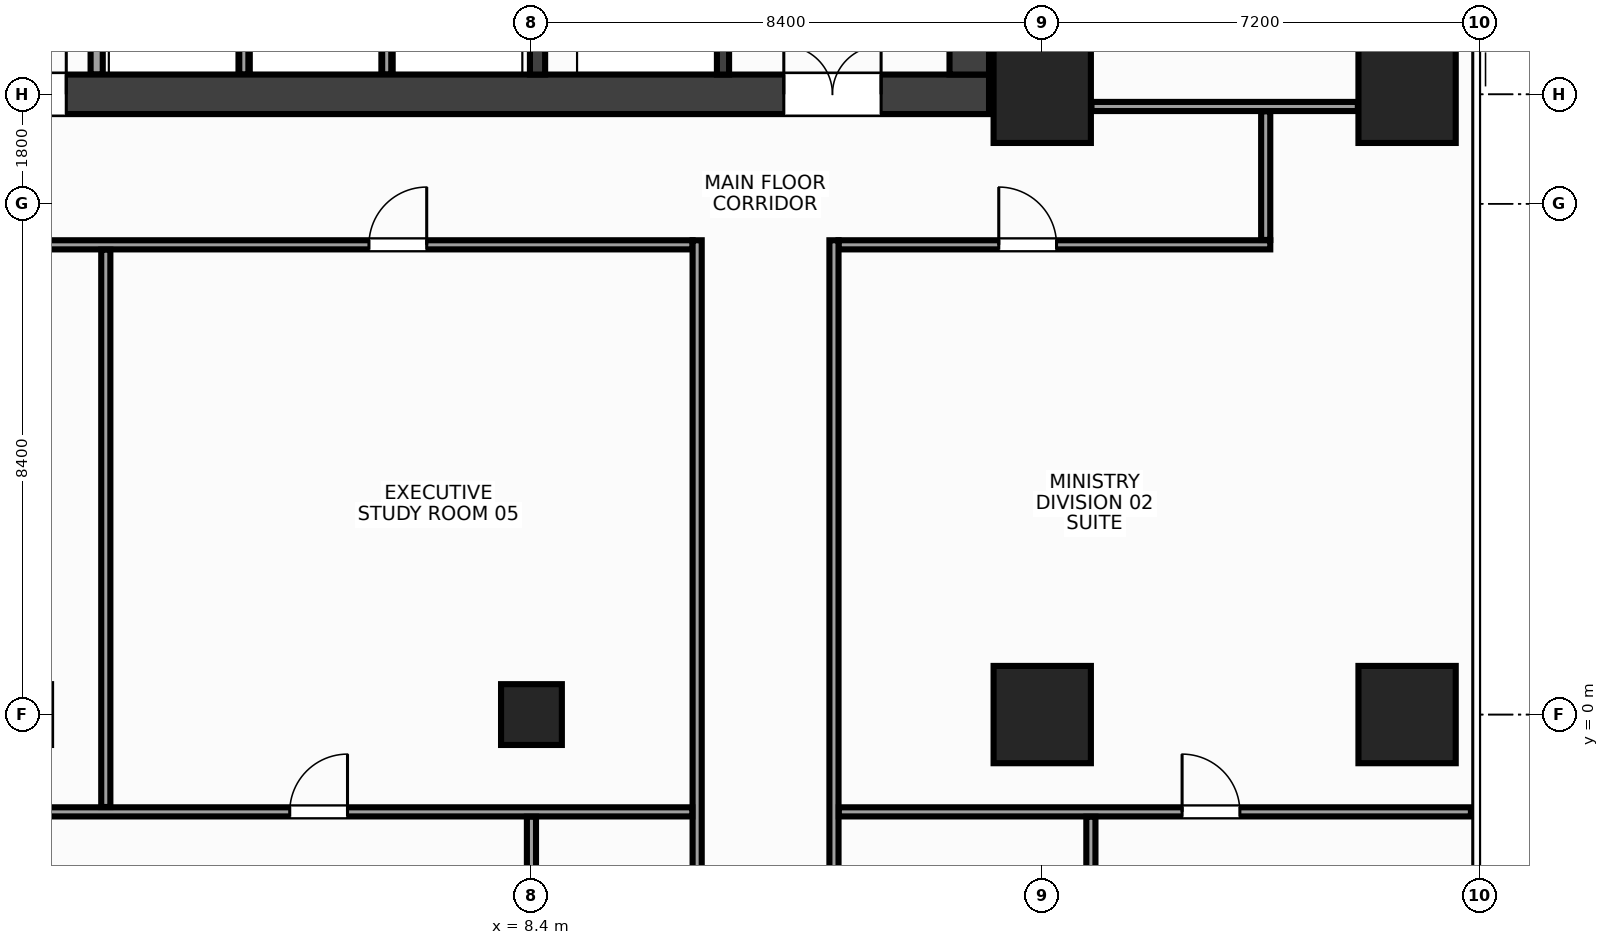
"""IFC4 building model, lengths in metres.
Left out: names, types, materials, properties, quantities, classifications, styles, units other than length and angle.
Written with IfcOpenShell. Run it as: python <this file> out.ifc"""

import sys

from ifc_helpers import new_model, si_unit, direction, frame, frame_2d, origin, origin_2d, place, context, subcontext, project, spatial, rectangle, hollow_rectangle, extrude, source, transform, mapped, element, fill, save


model = new_model("IFC4")
c1 = context("Model", 3, precision=1e-05, world=origin(), true_north=direction((0.0, 1.0)))
c2 = subcontext(c1, "Body", "Model", "MODEL_VIEW")
j1 = project(units=[si_unit("LENGTHUNIT", "METRE"), si_unit("PLANEANGLEUNIT", "RADIAN")], contexts=[c1])
p1 = place(None, origin())
s1 = spatial("IfcSite", under=j1, at=p1, CompositionType="ELEMENT")
p2 = place(p1, origin())
s2 = spatial("IfcBuilding", under=s1, at=p2, CompositionType="ELEMENT")
p3 = place(p2, frame((0.0, 0.0, 146.0)))
s3 = spatial("IfcBuildingStorey", under=s2, at=p3, CompositionType="ELEMENT", Elevation=146.0)
m1 = source(origin(), c2, "Body", "SweptSolid", [
    extrude(rectangle(XDim=31.85, YDim=0.65, at=frame_2d((15.925, 0.0))), origin(), (0.0, 0.0, 1.0), 3.6),
])
p4 = place(p3, frame((-15.925, 10.2, 0.0), z_axis=(0.0, 0.0, 1.0), x_axis=(1.0, 0.0, 0.0)))
e1 = element("IfcWall", 1, at=p4, inside=s3, PredefinedType="SHEAR", context=c2, shape_type="MappedRepresentation", body=[
    mapped(m1, transform((0.0, 0.0, 0.0), x_axis=(1.0, 0.0, 0.0), y_axis=(0.0, 1.0, 0.0), z_axis=(0.0, 0.0, 1.0), scale=1.0)),
])
p5 = place(p4, frame((1.775, 0.0, 0.0)))
e2 = element("IfcOpeningElement", 2, at=p5, cuts=e1, PredefinedType="OPENING", context=c2, shape_type="SweptSolid", body=[
    extrude(rectangle(XDim=1.6, YDim=2.15, at=frame_2d((0.8, 1.075))), frame((0.0, 0.337, 0.0), z_axis=(0.0, -1.0, 0.0), x_axis=(1.0, 0.0, 0.0)), (0.0, 0.0, 1.0), 0.674),
])
p6 = place(p4, frame((28.475, 0.0, 0.0)))
e3 = element("IfcOpeningElement", 3, at=p6, cuts=e1, PredefinedType="OPENING", context=c2, shape_type="SweptSolid", body=[
    extrude(rectangle(XDim=1.6, YDim=2.15, at=frame_2d((0.8, 1.075))), frame((0.0, 0.337, 0.0), z_axis=(0.0, -1.0, 0.0), x_axis=(1.0, 0.0, 0.0)), (0.0, 0.0, 1.0), 0.674),
])
p7 = place(p4, frame((15.175, 0.0, 0.0)))
e4 = element("IfcOpeningElement", 4, at=p7, cuts=e1, PredefinedType="OPENING", context=c2, shape_type="SweptSolid", body=[
    extrude(rectangle(XDim=1.5, YDim=2.2, at=frame_2d((0.75, 1.1))), frame((0.0, 0.337, 0.0), z_axis=(0.0, -1.0, 0.0), x_axis=(1.0, 0.0, 0.0)), (0.0, 0.0, 1.0), 0.674),
])
m2 = source(origin(), c2, "Body", "SweptSolid", [
    extrude(rectangle(XDim=12.95, YDim=0.65, at=frame_2d((6.475, 0.0))), origin(), (0.0, 0.0, 1.0), 3.6),
])
p8 = place(p3, frame((15.6, 10.525, 0.0), z_axis=(0.0, 0.0, 1.0), x_axis=(0.0, 1.0, 0.0)))
e5 = element("IfcWall", 5, at=p8, inside=s3, PredefinedType="SHEAR", context=c2, shape_type="MappedRepresentation", body=[
    mapped(m2, transform((0.0, 0.0, 0.0), x_axis=(1.0, 0.0, 0.0), y_axis=(0.0, 1.0, 0.0), z_axis=(0.0, 0.0, 1.0), scale=1.0)),
])
m3 = source(origin(), c2, "Body", "SweptSolid", [
    extrude(rectangle(XDim=12.95, YDim=0.25, at=frame_2d((6.475, 0.0))), origin(), (0.0, 0.0, 1.0), 3.6),
])
p9 = place(p3, frame((8.5, 10.525, 0.0), z_axis=(0.0, 0.0, 1.0), x_axis=(0.0, 1.0, 0.0)))
e6 = element("IfcWall", 6, at=p9, inside=s3, PredefinedType="SHEAR", context=c2, shape_type="MappedRepresentation", body=[
    mapped(m3, transform((0.0, 0.0, 0.0), x_axis=(1.0, 0.0, 0.0), y_axis=(0.0, 1.0, 0.0), z_axis=(0.0, 0.0, 1.0), scale=1.0)),
])
p10 = place(p9, frame((9.925, 0.0, 0.0)))
e7 = element("IfcOpeningElement", 7, at=p10, cuts=e6, PredefinedType="OPENING", context=c2, shape_type="SweptSolid", body=[
    extrude(rectangle(XDim=0.95, YDim=2.15, at=frame_2d((0.475, 1.075))), frame((0.0, 0.137, 0.0), z_axis=(0.0, -1.0, 0.0), x_axis=(1.0, 0.0, 0.0)), (0.0, 0.0, 1.0), 0.274),
])
m4 = source(origin(), c2, "Body", "SweptSolid", [
    extrude(rectangle(XDim=3.125, YDim=0.2, at=frame_2d((1.562, 0.0))), origin(), (0.0, 0.0, 1.0), 3.6),
])
p11 = place(p3, frame((11.55, 10.525, 0.0), z_axis=(0.0, 0.0, 1.0), x_axis=(0.0, 1.0, 0.0)))
e8 = element("IfcWall", 8, at=p11, inside=s3, PredefinedType="SHEAR", context=c2, shape_type="MappedRepresentation", body=[
    mapped(m4, transform((0.0, 0.0, 0.0), x_axis=(1.0, 0.0, 0.0), y_axis=(0.0, 1.0, 0.0), z_axis=(0.0, 0.0, 1.0), scale=1.0)),
])
p12 = place(p11, frame((0.9, 0.0, 0.0)))
e9 = element("IfcOpeningElement", 9, at=p12, cuts=e8, PredefinedType="OPENING", context=c2, shape_type="SweptSolid", body=[
    extrude(rectangle(XDim=1.1, YDim=2.15, at=frame_2d((0.55, 1.075))), frame((0.0, 0.112, 0.0), z_axis=(0.0, -1.0, 0.0), x_axis=(1.0, 0.0, 0.0)), (0.0, 0.0, 1.0), 0.224),
])
m5 = source(origin(), c2, "Body", "SweptSolid", [
    extrude(rectangle(XDim=1.6, YDim=1.6, at=origin_2d()), origin(), (0.0, 0.0, 1.0), 3.6),
])
for number, where, z_axis, x_axis in (
    (10, (16.8, 0.0, 0.0), (0.0, 0.0, 1.0), (1.0, 0.0, 0.0)),
    (11, (16.8, 10.2, 0.0), (0.0, 0.0, 1.0), (1.0, 0.0, 0.0)),
    (12, (22.8, 0.0, 0.0), (0.0, 0.0, 1.0), (1.0, 0.0, 0.0)),
    (13, (22.8, 10.2, 0.0), (0.0, 0.0, 1.0), (1.0, 0.0, 0.0)),
):
    element("IfcColumn", number, at=place(p3, frame(where, z_axis=z_axis, x_axis=x_axis)), inside=s3, PredefinedType="COLUMN", context=c2, shape_type="MappedRepresentation", body=[
        mapped(m5, transform((0.0, 0.0, 0.0), x_axis=(1.0, 0.0, 0.0), y_axis=(0.0, 1.0, 0.0), z_axis=(0.0, 0.0, 1.0), scale=1.0)),
    ])
m6 = source(origin(), c2, "Body", "SweptSolid", [
    extrude(hollow_rectangle(XDim=1.0, YDim=1.0, WallThickness=0.045, at=origin_2d()), origin(), (0.0, 0.0, 1.0), 3.6),
])
p13 = place(p3, frame((8.4, 0.0, 0.0), z_axis=(0.0, 0.0, 1.0), x_axis=(1.0, 0.0, 0.0)))
e14 = element("IfcColumn", 14, at=p13, inside=s3, PredefinedType="COLUMN", context=c2, shape_type="MappedRepresentation", body=[
    mapped(m6, transform((0.0, 0.0, 0.0), x_axis=(1.0, 0.0, 0.0), y_axis=(0.0, 1.0, 0.0), z_axis=(0.0, 0.0, 1.0), scale=1.0)),
])
m7 = source(origin(), c2, "Body", "SweptSolid", [
    extrude(rectangle(XDim=3.415, YDim=0.2, at=frame_2d((1.708, 0.0))), origin(), (0.0, 0.0, 1.0), 3.38),
])
p14 = place(p3, frame((1.25, 10.525, 0.0), z_axis=(0.0, 0.0, 1.0), x_axis=(0.0, 1.0, 0.0)))
e15 = element("IfcWall", 15, at=p14, inside=s3, PredefinedType="PARTITIONING", context=c2, shape_type="MappedRepresentation", body=[
    mapped(m7, transform((0.0, 0.0, 0.0), x_axis=(1.0, 0.0, 0.0), y_axis=(0.0, 1.0, 0.0), z_axis=(0.0, 0.0, 1.0), scale=1.0)),
])
m8 = source(origin(), c2, "Body", "SweptSolid", [
    extrude(rectangle(XDim=3.415, YDim=0.15, at=frame_2d((1.708, 0.0))), origin(), (0.0, 0.0, 1.0), 3.38),
])
for number, where, z_axis, x_axis in (
    (16, (3.67, 10.525, 0.0), (0.0, 0.0, 1.0), (0.0, 1.0, 0.0)),
    (17, (6.02, 10.525, 0.0), (0.0, 0.0, 1.0), (0.0, 1.0, 0.0)),
):
    element("IfcWall", number, at=place(p3, frame(where, z_axis=z_axis, x_axis=x_axis)), inside=s3, PredefinedType="PARTITIONING", context=c2, shape_type="MappedRepresentation", body=[
        mapped(m8, transform((0.0, 0.0, 0.0), x_axis=(1.0, 0.0, 0.0), y_axis=(0.0, 1.0, 0.0), z_axis=(0.0, 0.0, 1.0), scale=1.0)),
    ])
m9 = source(origin(), c2, "Body", "SweptSolid", [
    extrude(rectangle(XDim=4.38, YDim=0.15, at=frame_2d((2.19, 0.0))), origin(), (0.0, 0.0, 1.0), 2.915),
])
p15 = place(p3, frame((17.61, 10.0, 0.0), z_axis=(0.0, 0.0, 1.0), x_axis=(1.0, 0.0, 0.0)))
e18 = element("IfcWall", 18, at=p15, inside=s3, PredefinedType="PARTITIONING", context=c2, shape_type="MappedRepresentation", body=[
    mapped(m9, transform((0.0, 0.0, 0.0), x_axis=(1.0, 0.0, 0.0), y_axis=(0.0, 1.0, 0.0), z_axis=(0.0, 0.0, 1.0), scale=1.0)),
])
m10 = source(origin(), c2, "Body", "SweptSolid", [
    extrude(rectangle(XDim=31.6, YDim=0.15, at=frame_2d((15.8, 0.0))), origin(), (0.0, 0.0, 1.0), 2.765),
])
p16 = place(p3, frame((-20.55, 7.725, 0.0), z_axis=(0.0, 0.0, 1.0), x_axis=(1.0, 0.0, 0.0)))
e19 = element("IfcWall", 19, at=p16, inside=s3, PredefinedType="PARTITIONING", context=c2, shape_type="MappedRepresentation", body=[
    mapped(m10, transform((0.0, 0.0, 0.0), x_axis=(1.0, 0.0, 0.0), y_axis=(0.0, 1.0, 0.0), z_axis=(0.0, 0.0, 1.0), scale=1.0)),
])
p17 = place(p16, frame((0.722, 0.0, 0.0)))
e20 = element("IfcOpeningElement", 20, at=p17, cuts=e19, PredefinedType="OPENING", context=c2, shape_type="SweptSolid", body=[
    extrude(rectangle(XDim=0.95, YDim=2.15, at=frame_2d((0.475, 1.075))), frame((0.0, 0.087, 0.0), z_axis=(0.0, -1.0, 0.0), x_axis=(1.0, 0.0, 0.0)), (0.0, 0.0, 1.0), 0.174),
])
p18 = place(p16, frame((6.075, 0.0, 0.0)))
e21 = element("IfcOpeningElement", 21, at=p18, cuts=e19, PredefinedType="OPENING", context=c2, shape_type="SweptSolid", body=[
    extrude(rectangle(XDim=0.95, YDim=2.15, at=frame_2d((0.475, 1.075))), frame((0.0, 0.087, 0.0), z_axis=(0.0, -1.0, 0.0), x_axis=(1.0, 0.0, 0.0)), (0.0, 0.0, 1.0), 0.174),
])
p19 = place(p16, frame((15.875, 0.0, 0.0)))
e22 = element("IfcOpeningElement", 22, at=p19, cuts=e19, PredefinedType="OPENING", context=c2, shape_type="SweptSolid", body=[
    extrude(rectangle(XDim=0.95, YDim=2.15, at=frame_2d((0.475, 1.075))), frame((0.0, 0.087, 0.0), z_axis=(0.0, -1.0, 0.0), x_axis=(1.0, 0.0, 0.0)), (0.0, 0.0, 1.0), 0.174),
])
p20 = place(p16, frame((26.278, 0.0, 0.0)))
e23 = element("IfcOpeningElement", 23, at=p20, cuts=e19, PredefinedType="OPENING", context=c2, shape_type="SweptSolid", body=[
    extrude(rectangle(XDim=0.95, YDim=2.15, at=frame_2d((0.475, 1.075))), frame((0.0, 0.087, 0.0), z_axis=(0.0, -1.0, 0.0), x_axis=(1.0, 0.0, 0.0)), (0.0, 0.0, 1.0), 0.174),
])
m11 = source(origin(), c2, "Body", "SweptSolid", [
    extrude(rectangle(XDim=7.1, YDim=0.15, at=frame_2d((3.55, 0.0))), origin(), (0.0, 0.0, 1.0), 2.765),
])
p21 = place(p3, frame((13.45, 7.725, 0.0), z_axis=(0.0, 0.0, 1.0), x_axis=(1.0, 0.0, 0.0)))
e24 = element("IfcWall", 24, at=p21, inside=s3, PredefinedType="PARTITIONING", context=c2, shape_type="MappedRepresentation", body=[
    mapped(m11, transform((0.0, 0.0, 0.0), x_axis=(1.0, 0.0, 0.0), y_axis=(0.0, 1.0, 0.0), z_axis=(0.0, 0.0, 1.0), scale=1.0)),
])
p22 = place(p21, frame((2.635, 0.0, 0.0)))
e25 = element("IfcOpeningElement", 25, at=p22, cuts=e24, PredefinedType="OPENING", context=c2, shape_type="SweptSolid", body=[
    extrude(rectangle(XDim=0.95, YDim=2.15, at=frame_2d((0.475, 1.075))), frame((0.0, 0.087, 0.0), z_axis=(0.0, -1.0, 0.0), x_axis=(1.0, 0.0, 0.0)), (0.0, 0.0, 1.0), 0.174),
])
m12 = source(origin(), c2, "Body", "SweptSolid", [
    extrude(rectangle(XDim=2.115, YDim=0.15, at=frame_2d((1.058, 0.0))), origin(), (0.0, 0.0, 1.0), 3.38),
])
p23 = place(p3, frame((20.475, 7.805, 0.0), z_axis=(0.0, 0.0, 1.0), x_axis=(0.0, 1.0, 0.0)))
e26 = element("IfcWall", 26, at=p23, inside=s3, PredefinedType="PARTITIONING", context=c2, shape_type="MappedRepresentation", body=[
    mapped(m12, transform((0.0, 0.0, 0.0), x_axis=(1.0, 0.0, 0.0), y_axis=(0.0, 1.0, 0.0), z_axis=(0.0, 0.0, 1.0), scale=1.0)),
])
m13 = source(origin(), c2, "Body", "SweptSolid", [
    extrude(rectangle(XDim=22.595, YDim=0.15, at=frame_2d((11.297, 0.0))), origin(), (0.0, 0.0, 1.0), 2.665),
])
for number, where, z_axis, x_axis in (
    (27, (11.125, -14.795, 0.0), (0.0, 0.0, 1.0), (0.0, 1.0, 0.0)),
    (28, (13.375, -14.795, 0.0), (0.0, 0.0, 1.0), (0.0, 1.0, 0.0)),
):
    element("IfcWall", number, at=place(p3, frame(where, z_axis=z_axis, x_axis=x_axis)), inside=s3, PredefinedType="PARTITIONING", context=c2, shape_type="MappedRepresentation", body=[
        mapped(m13, transform((0.0, 0.0, 0.0), x_axis=(1.0, 0.0, 0.0), y_axis=(0.0, 1.0, 0.0), z_axis=(0.0, 0.0, 1.0), scale=1.0)),
    ])
m14 = source(origin(), c2, "Body", "SweptSolid", [
    extrude(rectangle(XDim=34.895, YDim=0.15, at=frame_2d((17.448, 0.0))), origin(), (0.0, 0.0, 1.0), 2.765),
])
p24 = place(p3, frame((-23.85, -1.6, 0.0), z_axis=(0.0, 0.0, 1.0), x_axis=(1.0, 0.0, 0.0)))
e29 = element("IfcWall", 29, at=p24, inside=s3, PredefinedType="PARTITIONING", context=c2, shape_type="MappedRepresentation", body=[
    mapped(m14, transform((0.0, 0.0, 0.0), x_axis=(1.0, 0.0, 0.0), y_axis=(0.0, 1.0, 0.0), z_axis=(0.0, 0.0, 1.0), scale=1.0)),
])
p25 = place(p24, frame((3.913, 0.0, 0.0)))
e30 = element("IfcOpeningElement", 30, at=p25, cuts=e29, PredefinedType="OPENING", context=c2, shape_type="SweptSolid", body=[
    extrude(rectangle(XDim=0.95, YDim=2.15, at=frame_2d((0.475, 1.075))), frame((0.0, 0.087, 0.0), z_axis=(0.0, -1.0, 0.0), x_axis=(1.0, 0.0, 0.0)), (0.0, 0.0, 1.0), 0.174),
])
p26 = place(p24, frame((9.675, 0.0, 0.0)))
e31 = element("IfcOpeningElement", 31, at=p26, cuts=e29, PredefinedType="OPENING", context=c2, shape_type="SweptSolid", body=[
    extrude(rectangle(XDim=0.95, YDim=2.15, at=frame_2d((0.475, 1.075))), frame((0.0, 0.087, 0.0), z_axis=(0.0, -1.0, 0.0), x_axis=(1.0, 0.0, 0.0)), (0.0, 0.0, 1.0), 0.174),
])
p27 = place(p24, frame((19.175, 0.0, 0.0)))
e32 = element("IfcOpeningElement", 32, at=p27, cuts=e29, PredefinedType="OPENING", context=c2, shape_type="SweptSolid", body=[
    extrude(rectangle(XDim=0.95, YDim=2.15, at=frame_2d((0.475, 1.075))), frame((0.0, 0.087, 0.0), z_axis=(0.0, -1.0, 0.0), x_axis=(1.0, 0.0, 0.0)), (0.0, 0.0, 1.0), 0.174),
])
p28 = place(p24, frame((28.275, 0.0, 0.0)))
e33 = element("IfcOpeningElement", 33, at=p28, cuts=e29, PredefinedType="OPENING", context=c2, shape_type="SweptSolid", body=[
    extrude(rectangle(XDim=0.95, YDim=2.15, at=frame_2d((0.475, 1.075))), frame((0.0, 0.087, 0.0), z_axis=(0.0, -1.0, 0.0), x_axis=(1.0, 0.0, 0.0)), (0.0, 0.0, 1.0), 0.174),
])
m15 = source(origin(), c2, "Body", "SweptSolid", [
    extrude(rectangle(XDim=10.395, YDim=0.15, at=frame_2d((5.198, 0.0))), origin(), (0.0, 0.0, 1.0), 2.765),
])
p29 = place(p3, frame((13.455, -1.6, 0.0), z_axis=(0.0, 0.0, 1.0), x_axis=(1.0, 0.0, 0.0)))
e34 = element("IfcWall", 34, at=p29, inside=s3, PredefinedType="PARTITIONING", context=c2, shape_type="MappedRepresentation", body=[
    mapped(m15, transform((0.0, 0.0, 0.0), x_axis=(1.0, 0.0, 0.0), y_axis=(0.0, 1.0, 0.0), z_axis=(0.0, 0.0, 1.0), scale=1.0)),
])
p30 = place(p29, frame((5.645, 0.0, 0.0)))
e35 = element("IfcOpeningElement", 35, at=p30, cuts=e34, PredefinedType="OPENING", context=c2, shape_type="SweptSolid", body=[
    extrude(rectangle(XDim=0.95, YDim=2.15, at=frame_2d((0.475, 1.075))), frame((0.0, 0.087, 0.0), z_axis=(0.0, -1.0, 0.0), x_axis=(1.0, 0.0, 0.0)), (0.0, 0.0, 1.0), 0.174),
])
m16 = source(origin(), c2, "Body", "SweptSolid", [
    extrude(rectangle(XDim=9.165, YDim=0.15, at=frame_2d((4.583, 0.0))), origin(), (0.0, 0.0, 1.0), 2.665),
])
p31 = place(p3, frame((1.4, -1.52, 0.0), z_axis=(0.0, 0.0, 1.0), x_axis=(0.0, 1.0, 0.0)))
e36 = element("IfcWall", 36, at=p31, inside=s3, PredefinedType="PARTITIONING", context=c2, shape_type="MappedRepresentation", body=[
    mapped(m16, transform((0.0, 0.0, 0.0), x_axis=(1.0, 0.0, 0.0), y_axis=(0.0, 1.0, 0.0), z_axis=(0.0, 0.0, 1.0), scale=1.0)),
])
m17 = source(origin(), c2, "Body", "SweptSolid", [
    extrude(rectangle(XDim=8.61, YDim=0.15, at=frame_2d((4.305, 0.0))), origin(), (0.0, 0.0, 1.0), 2.765),
])
p32 = place(p3, frame((8.4, -10.29, 0.0), z_axis=(0.0, 0.0, 1.0), x_axis=(0.0, 1.0, 0.0)))
e37 = element("IfcWall", 37, at=p32, inside=s3, PredefinedType="PARTITIONING", context=c2, shape_type="MappedRepresentation", body=[
    mapped(m17, transform((0.0, 0.0, 0.0), x_axis=(1.0, 0.0, 0.0), y_axis=(0.0, 1.0, 0.0), z_axis=(0.0, 0.0, 1.0), scale=1.0)),
])
m18 = source(origin(), c2, "Body", "SweptSolid", [
    extrude(rectangle(XDim=8.31, YDim=0.15, at=frame_2d((4.155, 0.0))), origin(), (0.0, 0.0, 1.0), 3.38),
])
p33 = place(p3, frame((17.6, -9.99, 0.0), z_axis=(0.0, 0.0, 1.0), x_axis=(0.0, 1.0, 0.0)))
e38 = element("IfcWall", 38, at=p33, inside=s3, PredefinedType="PARTITIONING", context=c2, shape_type="MappedRepresentation", body=[
    mapped(m18, transform((0.0, 0.0, 0.0), x_axis=(1.0, 0.0, 0.0), y_axis=(0.0, 1.0, 0.0), z_axis=(0.0, 0.0, 1.0), scale=1.0)),
])
m19 = source(origin(), c2, "Body", "SweptSolid", [
    extrude(rectangle(XDim=1.6, YDim=2.15, at=frame_2d((0.8, 1.075))), frame((0.0, 0.025, 0.0), z_axis=(0.0, -1.0, 0.0), x_axis=(1.0, 0.0, 0.0)), (0.0, 0.0, 1.0), 0.05),
])
p34 = place(p6, origin())
e39 = element("IfcDoor", 39, at=p34, inside=s3, OperationType="DOUBLE_DOOR_SINGLE_SWING", PredefinedType="DOOR", context=c2, shape_type="MappedRepresentation", body=[
    mapped(m19, transform((0.0, 0.0, 0.0), x_axis=(1.0, 0.0, 0.0), y_axis=(0.0, 1.0, 0.0), z_axis=(0.0, 0.0, 1.0), scale=1.0)),
])
fill(e3, e39)
m20 = source(origin(), c2, "Body", "SweptSolid", [
    extrude(rectangle(XDim=1.5, YDim=2.2, at=frame_2d((0.75, 1.1))), frame((0.0, 0.025, 0.0), z_axis=(0.0, -1.0, 0.0), x_axis=(1.0, 0.0, 0.0)), (0.0, 0.0, 1.0), 0.05),
])
p35 = place(p7, origin())
e40 = element("IfcDoor", 40, at=p35, inside=s3, OperationType="DOUBLE_DOOR_SINGLE_SWING", PredefinedType="DOOR", context=c2, shape_type="MappedRepresentation", body=[
    mapped(m20, transform((0.0, 0.0, 0.0), x_axis=(1.0, 0.0, 0.0), y_axis=(0.0, 1.0, 0.0), z_axis=(0.0, 0.0, 1.0), scale=1.0)),
])
fill(e4, e40)
m21 = source(origin(), c2, "Body", "SweptSolid", [
    extrude(rectangle(XDim=0.95, YDim=2.15, at=frame_2d((0.475, 1.075))), frame((0.0, 0.025, 0.0), z_axis=(0.0, -1.0, 0.0), x_axis=(1.0, 0.0, 0.0)), (0.0, 0.0, 1.0), 0.05),
])
p36 = place(p22, origin())
e41 = element("IfcDoor", 41, at=p36, inside=s3, OperationType="SINGLE_SWING_LEFT", PredefinedType="DOOR", context=c2, shape_type="MappedRepresentation", body=[
    mapped(m21, transform((0.0, 0.0, 0.0), x_axis=(1.0, 0.0, 0.0), y_axis=(0.0, 1.0, 0.0), z_axis=(0.0, 0.0, 1.0), scale=1.0)),
])
fill(e25, e41)
p37 = place(p20, origin())
e42 = element("IfcDoor", 42, at=p37, inside=s3, OperationType="SINGLE_SWING_RIGHT", PredefinedType="DOOR", context=c2, shape_type="MappedRepresentation", body=[
    mapped(m21, transform((0.0, 0.0, 0.0), x_axis=(1.0, 0.0, 0.0), y_axis=(0.0, 1.0, 0.0), z_axis=(0.0, 0.0, 1.0), scale=1.0)),
])
fill(e23, e42)
p38 = place(p30, origin())
e43 = element("IfcDoor", 43, at=p38, inside=s3, OperationType="SINGLE_SWING_LEFT", PredefinedType="DOOR", context=c2, shape_type="MappedRepresentation", body=[
    mapped(m21, transform((0.0, 0.0, 0.0), x_axis=(1.0, 0.0, 0.0), y_axis=(0.0, 1.0, 0.0), z_axis=(0.0, 0.0, 1.0), scale=1.0)),
])
fill(e35, e43)
p39 = place(p28, origin())
e44 = element("IfcDoor", 44, at=p39, inside=s3, OperationType="SINGLE_SWING_RIGHT", PredefinedType="DOOR", context=c2, shape_type="MappedRepresentation", body=[
    mapped(m21, transform((0.0, 0.0, 0.0), x_axis=(1.0, 0.0, 0.0), y_axis=(0.0, 1.0, 0.0), z_axis=(0.0, 0.0, 1.0), scale=1.0)),
])
fill(e33, e44)
save(model, sys.argv[1])
